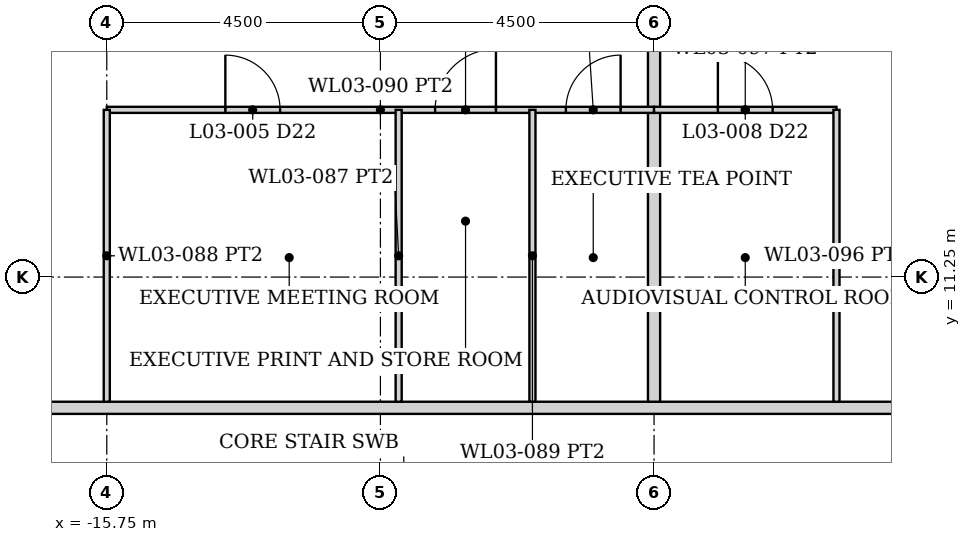
"""IFC4 building model, lengths in metres.
Left out: names, types, materials, properties, quantities, classifications, styles, units other than length and angle.
Written with IfcOpenShell. Run it as: python <this file> out.ifc"""

import sys

from ifc_helpers import new_model, si_unit, direction, frame, frame_2d, origin, place, context, subcontext, project, spatial, rectangle, extrude, element, fill, save


model = new_model("IFC4")
c1 = context("Model", 3, precision=1e-05, world=origin(), true_north=direction((0.0, 1.0)))
c2 = subcontext(c1, "Body", "Model", "MODEL_VIEW")
j1 = project(units=[si_unit("LENGTHUNIT", "METRE"), si_unit("PLANEANGLEUNIT", "RADIAN")], contexts=[c1])
p1 = place(None, origin())
s1 = spatial("IfcSite", under=j1, at=p1, CompositionType="ELEMENT")
p2 = place(p1, origin())
s2 = spatial("IfcBuilding", under=s1, at=p2, CompositionType="ELEMENT")
p3 = place(p2, frame((0.0, 0.0, 16.0)))
s3 = spatial("IfcBuildingStorey", under=s2, at=p3, CompositionType="ELEMENT", Elevation=16.0)
p4 = place(p3, frame((-25.075, 9.1, 0.0), z_axis=(0.0, 0.0, 1.0), x_axis=(1.0, 0.0, 0.0)))
e1 = element("IfcWall", 1, at=p4, inside=s3, PredefinedType="PARTITIONING", context=c2, shape_type="SweptSolid", body=[
    extrude(rectangle(XDim=50.15, YDim=0.2, at=frame_2d((25.075, 0.0))), origin(), (0.0, 0.0, 1.0), 4.329),
])
p5 = place(p4, frame((6.85, 0.0, 0.0)))
e2 = element("IfcOpeningElement", 2, at=p5, cuts=e1, PredefinedType="OPENING", context=c2, shape_type="SweptSolid", body=[
    extrude(rectangle(XDim=0.9, YDim=2.1, at=frame_2d((0.45, 1.05))), frame((0.0, 0.11, 0.0), z_axis=(0.0, -1.0, 0.0), x_axis=(1.0, 0.0, 0.0)), (0.0, 0.0, 1.0), 0.22),
])
p6 = place(p4, frame((24.075, 0.0, 0.0)))
e3 = element("IfcOpeningElement", 3, at=p6, cuts=e1, PredefinedType="OPENING", context=c2, shape_type="SweptSolid", body=[
    extrude(rectangle(XDim=2.0, YDim=2.4, at=frame_2d((1.0, 1.2))), frame((0.0, 0.11, 0.0), z_axis=(0.0, -1.0, 0.0), x_axis=(1.0, 0.0, 0.0)), (0.0, 0.0, 1.0), 0.22),
])
p7 = place(p4, frame((42.4, 0.0, 0.0)))
e4 = element("IfcOpeningElement", 4, at=p7, cuts=e1, PredefinedType="OPENING", context=c2, shape_type="SweptSolid", body=[
    extrude(rectangle(XDim=0.9, YDim=2.1, at=frame_2d((0.45, 1.05))), frame((0.0, 0.11, 0.0), z_axis=(0.0, -1.0, 0.0), x_axis=(1.0, 0.0, 0.0)), (0.0, 0.0, 1.0), 0.22),
])
p8 = place(p3, frame((-6.75, 9.2, 0.0), z_axis=(0.0, 0.0, 1.0), x_axis=(0.0, 1.0, 0.0)))
e5 = element("IfcWall", 5, at=p8, inside=s3, PredefinedType="PARTITIONING", context=c2, shape_type="SweptSolid", body=[
    extrude(rectangle(XDim=19.889, YDim=0.2, at=frame_2d((9.944, 0.0))), origin(), (0.0, 0.0, 1.0), 4.329),
])
p9 = place(p3, frame((-15.75, 14.0, 0.0), z_axis=(0.0, 0.0, 1.0), x_axis=(1.0, 0.0, 0.0)))
e6 = element("IfcWall", 6, at=p9, inside=s3, PredefinedType="PARTITIONING", context=c2, shape_type="SweptSolid", body=[
    extrude(rectangle(XDim=9.0, YDim=0.1, at=frame_2d((4.5, 0.0))), origin(), (0.0, 0.0, 1.0), 4.329),
])
p10 = place(p9, frame((1.95, 0.0, 0.0)))
e7 = element("IfcOpeningElement", 7, at=p10, cuts=e6, PredefinedType="OPENING", context=c2, shape_type="SweptSolid", body=[
    extrude(rectangle(XDim=0.9, YDim=2.1, at=frame_2d((0.45, 1.05))), frame((0.0, 0.06, 0.0), z_axis=(0.0, -1.0, 0.0), x_axis=(1.0, 0.0, 0.0)), (0.0, 0.0, 1.0), 0.12),
])
p11 = place(p9, frame((5.4, 0.0, 0.0)))
e8 = element("IfcOpeningElement", 8, at=p11, cuts=e6, PredefinedType="OPENING", context=c2, shape_type="SweptSolid", body=[
    extrude(rectangle(XDim=1.0, YDim=2.1, at=frame_2d((0.5, 1.05))), frame((0.0, 0.06, 0.0), z_axis=(0.0, -1.0, 0.0), x_axis=(1.0, 0.0, 0.0)), (0.0, 0.0, 1.0), 0.12),
])
p12 = place(p9, frame((7.55, 0.0, 0.0)))
e9 = element("IfcOpeningElement", 9, at=p12, cuts=e6, PredefinedType="OPENING", context=c2, shape_type="SweptSolid", body=[
    extrude(rectangle(XDim=0.9, YDim=2.1, at=frame_2d((0.45, 1.05))), frame((0.0, 0.06, 0.0), z_axis=(0.0, -1.0, 0.0), x_axis=(1.0, 0.0, 0.0)), (0.0, 0.0, 1.0), 0.12),
])
for number, where, z_axis, x_axis in (
    (10, (-15.75, 9.2, 0.0), (0.0, 0.0, 1.0), (0.0, 1.0, 0.0)),
    (11, (-10.95, 9.2, 0.0), (0.0, 0.0, 1.0), (0.0, 1.0, 0.0)),
    (12, (-8.75, 9.2, 0.0), (0.0, 0.0, 1.0), (0.0, 1.0, 0.0)),
):
    element("IfcWall", number, at=place(p3, frame(where, z_axis=z_axis, x_axis=x_axis)), inside=s3, PredefinedType="PARTITIONING", context=c2, shape_type="SweptSolid", body=[
        extrude(rectangle(XDim=4.8, YDim=0.1, at=frame_2d((2.4, 0.0))), origin(), (0.0, 0.0, 1.0), 4.329),
    ])
p13 = place(p3, frame((-6.75, 14.0, 0.0), z_axis=(0.0, 0.0, 1.0), x_axis=(1.0, 0.0, 0.0)))
e13 = element("IfcWall", 13, at=p13, inside=s3, PredefinedType="PARTITIONING", context=c2, shape_type="SweptSolid", body=[
    extrude(rectangle(XDim=3.0, YDim=0.1, at=frame_2d((1.5, 0.0))), origin(), (0.0, 0.0, 1.0), 4.329),
])
p14 = place(p13, frame((1.05, 0.0, 0.0)))
e14 = element("IfcOpeningElement", 14, at=p14, cuts=e13, PredefinedType="OPENING", context=c2, shape_type="SweptSolid", body=[
    extrude(rectangle(XDim=0.9, YDim=2.1, at=frame_2d((0.45, 1.05))), frame((0.0, 0.06, 0.0), z_axis=(0.0, -1.0, 0.0), x_axis=(1.0, 0.0, 0.0)), (0.0, 0.0, 1.0), 0.12),
])
p15 = place(p3, frame((-3.75, 9.2, 0.0), z_axis=(0.0, 0.0, 1.0), x_axis=(0.0, 1.0, 0.0)))
e15 = element("IfcWall", 15, at=p15, inside=s3, PredefinedType="PARTITIONING", context=c2, shape_type="SweptSolid", body=[
    extrude(rectangle(XDim=4.8, YDim=0.1, at=frame_2d((2.4, 0.0))), origin(), (0.0, 0.0, 1.0), 4.329),
])
p16 = place(p10, origin())
e16 = element("IfcDoor", 16, at=p16, inside=s3, OperationType="SINGLE_SWING_LEFT", PredefinedType="DOOR", context=c2, shape_type="SweptSolid", body=[
    extrude(rectangle(XDim=0.9, YDim=2.1, at=frame_2d((0.45, 1.05))), frame((0.0, 0.025, 0.0), z_axis=(0.0, -1.0, 0.0), x_axis=(1.0, 0.0, 0.0)), (0.0, 0.0, 1.0), 0.05),
])
fill(e7, e16)
p17 = place(p11, origin())
e17 = element("IfcDoor", 17, at=p17, inside=s3, OperationType="SINGLE_SWING_RIGHT", PredefinedType="DOOR", context=c2, shape_type="SweptSolid", body=[
    extrude(rectangle(XDim=1.0, YDim=2.1, at=frame_2d((0.5, 1.05))), frame((0.0, 0.025, 0.0), z_axis=(0.0, -1.0, 0.0), x_axis=(1.0, 0.0, 0.0)), (0.0, 0.0, 1.0), 0.05),
])
fill(e8, e17)
p18 = place(p12, origin())
e18 = element("IfcDoor", 18, at=p18, inside=s3, OperationType="SINGLE_SWING_RIGHT", PredefinedType="DOOR", context=c2, shape_type="SweptSolid", body=[
    extrude(rectangle(XDim=0.9, YDim=2.1, at=frame_2d((0.45, 1.05))), frame((0.0, 0.025, 0.0), z_axis=(0.0, -1.0, 0.0), x_axis=(1.0, 0.0, 0.0)), (0.0, 0.0, 1.0), 0.05),
])
fill(e9, e18)
p19 = place(p14, origin())
e19 = element("IfcDoor", 19, at=p19, inside=s3, OperationType="SINGLE_SWING_LEFT", PredefinedType="DOOR", context=c2, shape_type="SweptSolid", body=[
    extrude(rectangle(XDim=0.9, YDim=2.1, at=frame_2d((0.45, 1.05))), frame((0.0, 0.025, 0.0), z_axis=(0.0, -1.0, 0.0), x_axis=(1.0, 0.0, 0.0)), (0.0, 0.0, 1.0), 0.05),
])
fill(e14, e19)
save(model, sys.argv[1])
